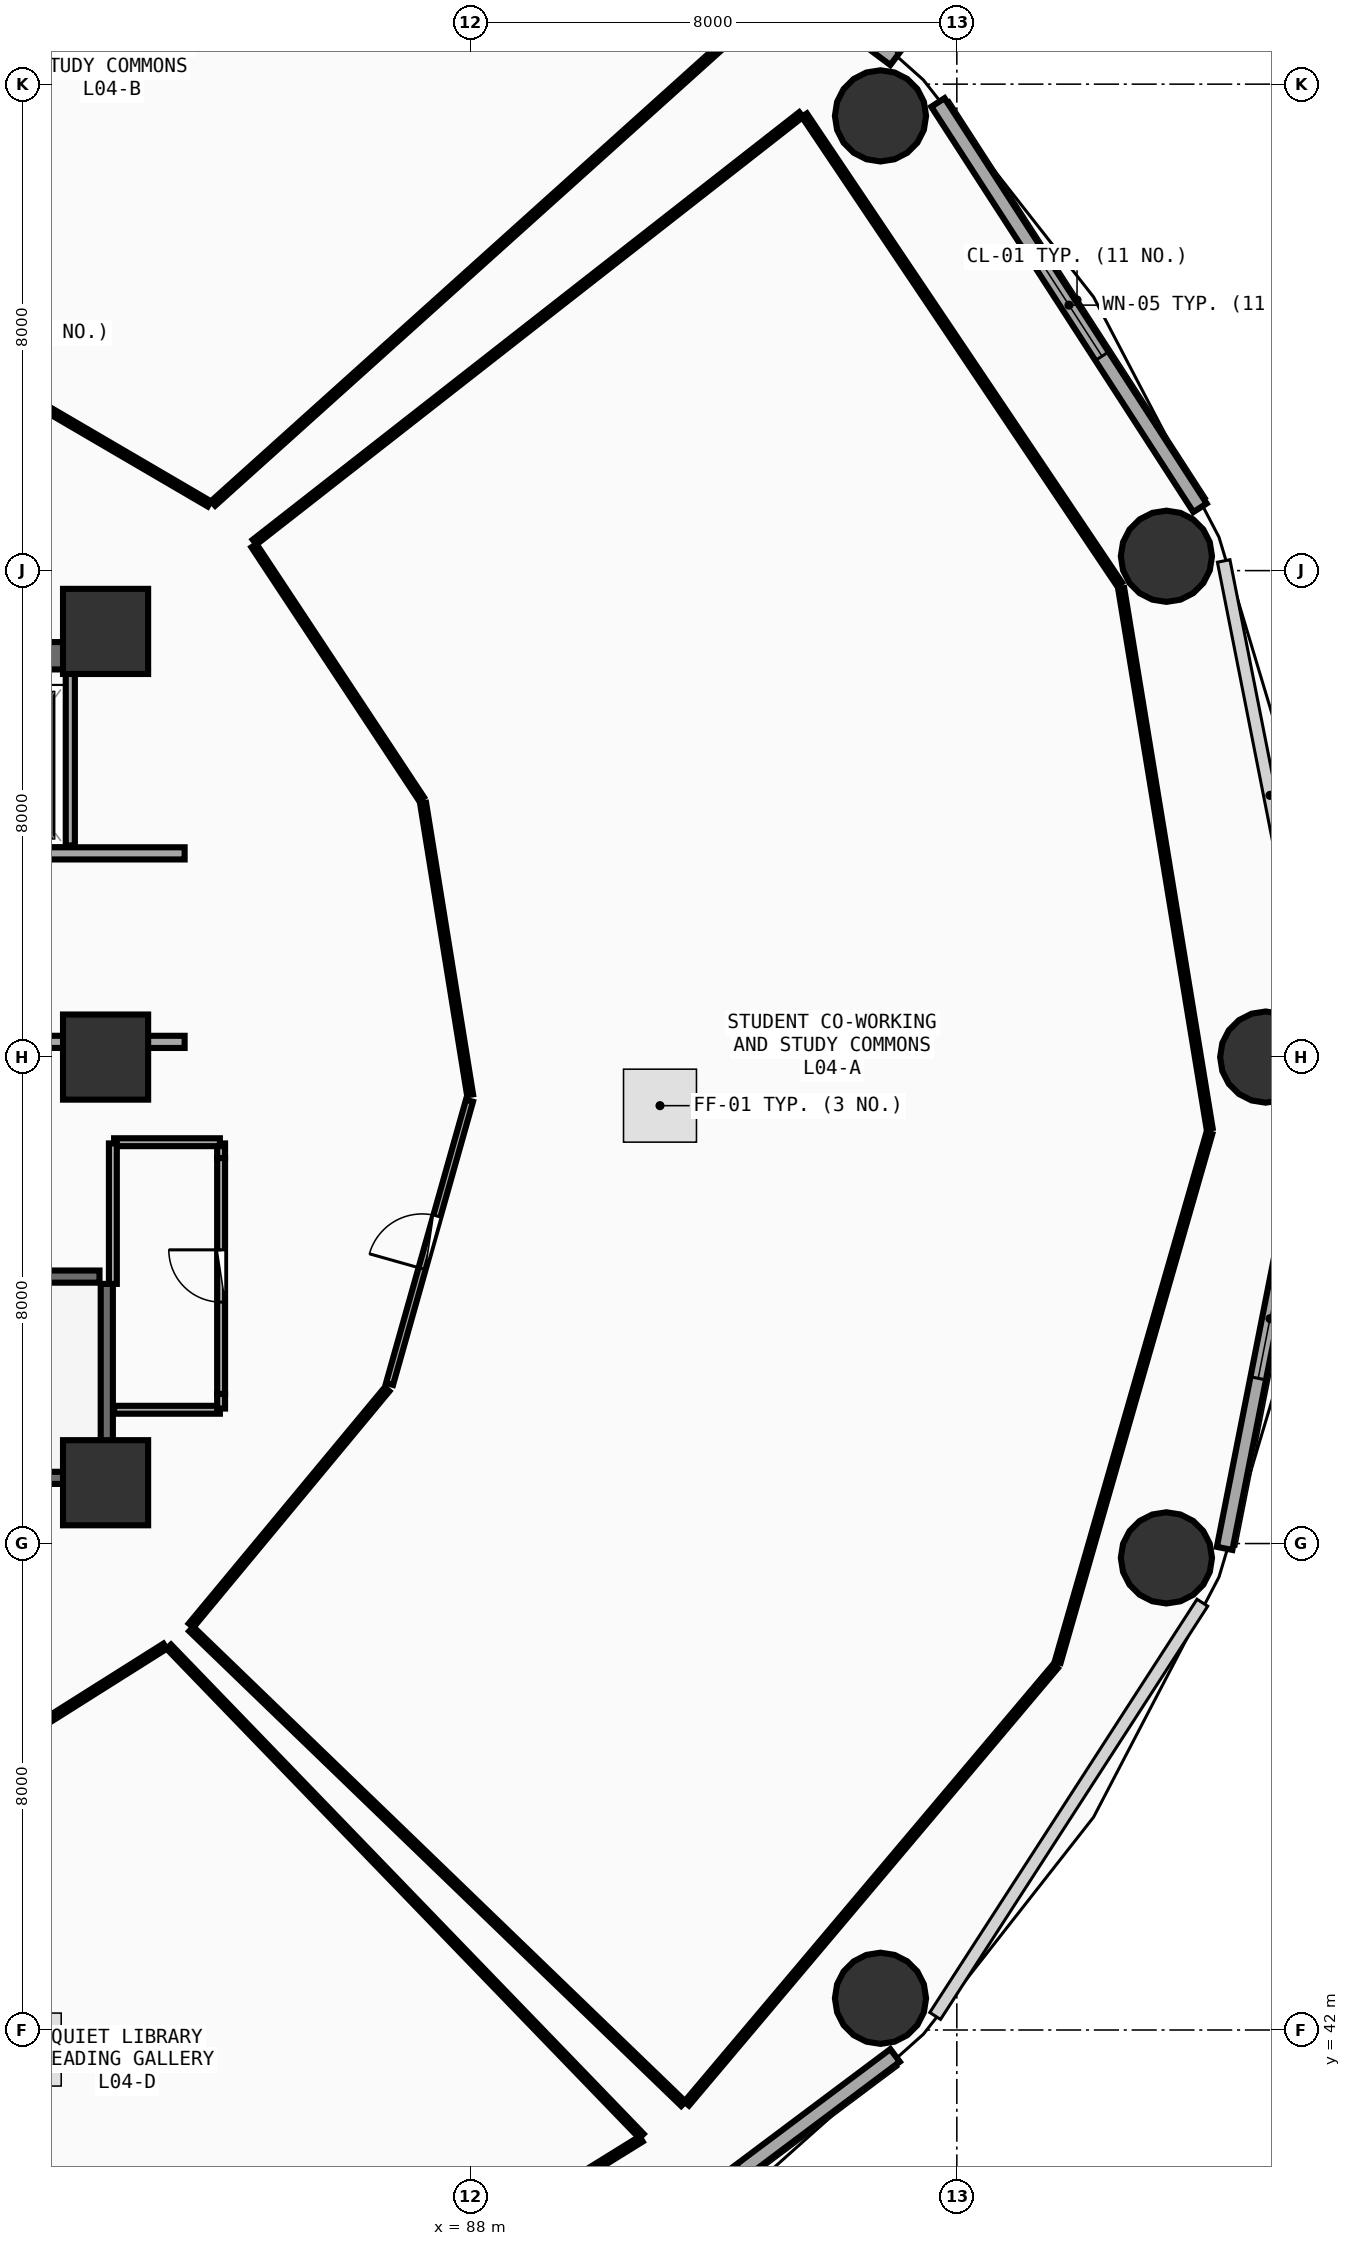
"""IFC4 building model, lengths in metres.
Left out: names, types, materials, properties, quantities, classifications, styles, units other than length and angle.
Written with IfcOpenShell. Run it as: python <this file> out.ifc"""

import sys

from ifc_helpers import new_model, si_unit, direction, frame, frame_2d, origin, origin_2d, place, context, subcontext, project, spatial, rectangle, circle, extrude, element, fill, save


model = new_model("IFC4")
c1 = context("Model", 3, precision=1e-05, world=origin(), true_north=direction((0.0, 1.0)))
c2 = subcontext(c1, "Body", "Model", "MODEL_VIEW")
j1 = project(units=[si_unit("LENGTHUNIT", "METRE"), si_unit("PLANEANGLEUNIT", "RADIAN")], contexts=[c1])
p1 = place(None, origin())
s1 = spatial("IfcSite", under=j1, at=p1, CompositionType="ELEMENT")
p2 = place(p1, origin())
s2 = spatial("IfcBuilding", under=s1, at=p2, CompositionType="ELEMENT")
p3 = place(p2, frame((0.0, 0.0, 18.0)))
s3 = spatial("IfcBuildingStorey", under=s2, at=p3, CompositionType="ELEMENT", Elevation=18.0)
for number, where, z_axis, x_axis in (
    (1, (82.0, 51.0, 0.0), (0.0, 0.0, 1.0), (1.0, 0.0, 0.0)),
    (2, (82.0, 58.0, 0.0), (0.0, 0.0, 1.0), (1.0, 0.0, 0.0)),
    (3, (82.0, 65.0, 0.0), (0.0, 0.0, 1.0), (1.0, 0.0, 0.0)),
):
    element("IfcColumn", number, at=place(p3, frame(where, z_axis=z_axis, x_axis=x_axis)), inside=s3, PredefinedType="PILASTER", context=c2, shape_type="SweptSolid", body=[
        extrude(rectangle(XDim=1.4, YDim=1.4, at=origin_2d()), origin(), (0.0, 0.0, 1.0), 4.5),
    ])
for number, where, z_axis, x_axis in (
    (4, (101.08, 58.0, 0.0), (0.0, 0.0, 1.0), (1.0, 0.0, 0.0)),
    (5, (99.447, 66.236, 0.0), (0.0, 0.0, 1.0), (1.0, 0.0, 0.0)),
    (6, (94.744, 73.478, 0.0), (0.0, 0.0, 1.0), (1.0, 0.0, 0.0)),
    (7, (94.744, 42.522, 0.0), (0.0, 0.0, 1.0), (1.0, 0.0, 0.0)),
    (8, (99.447, 49.764, 0.0), (0.0, 0.0, 1.0), (1.0, 0.0, 0.0)),
):
    element("IfcColumn", number, at=place(p3, frame(where, z_axis=z_axis, x_axis=x_axis)), inside=s3, PredefinedType="COLUMN", context=c2, shape_type="SweptSolid", body=[
        extrude(circle(Radius=0.75, at=origin_2d()), origin(), (0.0, 0.0, 1.0), 4.5),
    ])
p4 = place(p3, frame((99.999, 67.033, 0.0), z_axis=(0.0, 0.0, 1.0), x_axis=(-0.543005114258, 0.839729388488, 0.0)))
e9 = element("IfcWall", 9, at=p4, inside=s3, PredefinedType="SOLIDWALL", context=c2, shape_type="SweptSolid", body=[
    extrude(rectangle(XDim=7.938, YDim=0.26, at=frame_2d((3.969, 0.0))), origin(), (0.0, 0.0, 1.0), 4.225),
])
p5 = place(p4, frame((2.969, 0.0, 0.85)))
e10 = element("IfcOpeningElement", 10, at=p5, cuts=e9, PredefinedType="OPENING", context=c2, shape_type="SweptSolid", body=[
    extrude(rectangle(XDim=2.0, YDim=1.75, at=frame_2d((1.0, 0.875))), frame((0.0, 0.14, 0.0), z_axis=(0.0, -1.0, 0.0), x_axis=(1.0, 0.0, 0.0)), (0.0, 0.0, 1.0), 0.28),
])
p6 = place(p3, frame((94.984, 74.418, 0.0), z_axis=(0.0, 0.0, 1.0), x_axis=(-0.80030733173, 0.599590005569, 0.0)))
e11 = element("IfcWall", 11, at=p6, inside=s3, PredefinedType="SOLIDWALL", context=c2, shape_type="SweptSolid", body=[
    extrude(rectangle(XDim=8.291, YDim=0.26, at=frame_2d((4.145, 0.0))), origin(), (0.0, 0.0, 1.0), 4.225),
])
p7 = place(p6, frame((3.145, 0.0, 0.85)))
e12 = element("IfcOpeningElement", 12, at=p7, cuts=e11, PredefinedType="OPENING", context=c2, shape_type="SweptSolid", body=[
    extrude(rectangle(XDim=2.0, YDim=1.75, at=frame_2d((1.0, 0.875))), frame((0.0, 0.14, 0.0), z_axis=(0.0, -1.0, 0.0), x_axis=(1.0, 0.0, 0.0)), (0.0, 0.0, 1.0), 0.28),
])
p8 = place(p3, frame((88.349, 36.611, 0.0), z_axis=(0.0, 0.0, 1.0), x_axis=(0.80030733173, 0.599590005569, 0.0)))
e13 = element("IfcWall", 13, at=p8, inside=s3, PredefinedType="SOLIDWALL", context=c2, shape_type="SweptSolid", body=[
    extrude(rectangle(XDim=8.291, YDim=0.26, at=frame_2d((4.145, 0.0))), origin(), (0.0, 0.0, 1.0), 4.225),
])
p9 = place(p8, frame((3.145, 0.0, 0.85)))
e14 = element("IfcOpeningElement", 14, at=p9, cuts=e13, PredefinedType="OPENING", context=c2, shape_type="SweptSolid", body=[
    extrude(rectangle(XDim=2.0, YDim=1.75, at=frame_2d((1.0, 0.875))), frame((0.0, 0.14, 0.0), z_axis=(0.0, -1.0, 0.0), x_axis=(1.0, 0.0, 0.0)), (0.0, 0.0, 1.0), 0.28),
])
p10 = place(p3, frame((100.404, 49.92, 0.0), z_axis=(0.0, 0.0, 1.0), x_axis=(0.193726159581, 0.98105564322, 0.0)))
e15 = element("IfcWall", 15, at=p10, inside=s3, PredefinedType="SOLIDWALL", context=c2, shape_type="SweptSolid", body=[
    extrude(rectangle(XDim=7.703, YDim=0.26, at=frame_2d((3.851, 0.0))), origin(), (0.0, 0.0, 1.0), 4.225),
])
p11 = place(p10, frame((2.851, 0.0, 0.85)))
e16 = element("IfcOpeningElement", 16, at=p11, cuts=e15, PredefinedType="OPENING", context=c2, shape_type="SweptSolid", body=[
    extrude(rectangle(XDim=2.0, YDim=1.75, at=frame_2d((1.0, 0.875))), frame((0.0, 0.14, 0.0), z_axis=(0.0, -1.0, 0.0), x_axis=(1.0, 0.0, 0.0)), (0.0, 0.0, 1.0), 0.28),
])
p12 = place(p3, frame((74.0, 51.08, 0.0), z_axis=(0.0, 0.0, 1.0), x_axis=(1.0, 0.0, 0.0)))
e17 = element("IfcWall", 17, at=p12, inside=s3, PredefinedType="SHEAR", context=c2, shape_type="SweptSolid", body=[
    extrude(rectangle(XDim=7.9, YDim=0.2, at=frame_2d((3.95, 0.0))), origin(), (0.0, 0.0, 1.0), 4.24),
])
p13 = place(p12, frame((1.12, 0.0, 0.0)))
e18 = element("IfcOpeningElement", 18, at=p13, cuts=e17, PredefinedType="OPENING", context=c2, shape_type="SweptSolid", body=[
    extrude(rectangle(XDim=1.05, YDim=2.1, at=frame_2d((0.525, 1.05))), frame((0.0, 0.11, 0.0), z_axis=(0.0, -1.0, 0.0), x_axis=(1.0, 0.0, 0.0)), (0.0, 0.0, 1.0), 0.22),
])
p14 = place(p3, frame((82.02, 51.2, 0.0), z_axis=(0.0, 0.0, 1.0), x_axis=(0.0, 1.0, 0.0)))
e19 = element("IfcWall", 19, at=p14, inside=s3, PredefinedType="SHEAR", context=c2, shape_type="SweptSolid", body=[
    extrude(rectangle(XDim=3.07, YDim=0.2, at=frame_2d((1.535, 0.0))), origin(), (0.0, 0.0, 1.0), 4.24),
])
p15 = place(p3, frame((81.9, 54.39, 0.0), z_axis=(0.0, 0.0, 1.0), x_axis=(-1.0, 0.0, 0.0)))
e20 = element("IfcWall", 20, at=p15, inside=s3, PredefinedType="SHEAR", context=c2, shape_type="SweptSolid", body=[
    extrude(rectangle(XDim=8.46, YDim=0.2, at=frame_2d((4.23, 0.0))), origin(), (0.0, 0.0, 1.0), 4.24),
])
p16 = place(p3, frame((74.0, 64.6, 0.0), z_axis=(0.0, 0.0, 1.0), x_axis=(1.0, 0.0, 0.0)))
e21 = element("IfcWall", 21, at=p16, inside=s3, PredefinedType="SHEAR", context=c2, shape_type="SweptSolid", body=[
    extrude(rectangle(XDim=8.0, YDim=0.45, at=frame_2d((4.0, 0.0))), origin(), (0.0, 0.0, 1.0), 4.24),
])
p17 = place(p3, frame((79.3, 61.35, 0.0), z_axis=(0.0, 0.0, 1.0), x_axis=(1.0, 0.0, 0.0)))
e22 = element("IfcWall", 22, at=p17, inside=s3, PredefinedType="SOLIDWALL", context=c2, shape_type="SweptSolid", body=[
    extrude(rectangle(XDim=4.0, YDim=0.2, at=frame_2d((2.0, 0.0))), origin(), (0.0, 0.0, 1.0), 3.525),
])
p18 = place(p17, frame((0.45, 0.0, 0.0)))
e23 = element("IfcOpeningElement", 23, at=p18, cuts=e22, PredefinedType="OPENING", context=c2, shape_type="SweptSolid", body=[
    extrude(rectangle(XDim=1.2, YDim=2.15, at=frame_2d((0.6, 1.075))), frame((0.0, 0.11, 0.0), z_axis=(0.0, -1.0, 0.0), x_axis=(1.0, 0.0, 0.0)), (0.0, 0.0, 1.0), 0.22),
])
p19 = place(p3, frame((81.42, 61.48, 0.0), z_axis=(0.0, 0.0, 1.0), x_axis=(0.0, 1.0, 0.0)))
e24 = element("IfcWall", 24, at=p19, inside=s3, PredefinedType="PARTITIONING", context=c2, shape_type="SweptSolid", body=[
    extrude(rectangle(XDim=2.84, YDim=0.15, at=frame_2d((1.42, 0.0))), origin(), (0.0, 0.0, 1.0), 4.23),
])
p20 = place(p3, frame((79.3, 58.25, 0.0), z_axis=(0.0, 0.0, 1.0), x_axis=(1.0, 0.0, 0.0)))
e25 = element("IfcWall", 25, at=p20, inside=s3, PredefinedType="SOLIDWALL", context=c2, shape_type="SweptSolid", body=[
    extrude(rectangle(XDim=4.0, YDim=0.2, at=frame_2d((2.0, 0.0))), origin(), (0.0, 0.0, 1.0), 3.525),
])
p21 = place(p20, frame((0.5, 0.0, 0.0)))
e26 = element("IfcOpeningElement", 26, at=p21, cuts=e25, PredefinedType="OPENING", context=c2, shape_type="SweptSolid", body=[
    extrude(rectangle(XDim=1.1, YDim=2.1, at=frame_2d((0.55, 1.05))), frame((0.0, 0.11, 0.0), z_axis=(0.0, -1.0, 0.0), x_axis=(1.0, 0.0, 0.0)), (0.0, 0.0, 1.0), 0.22),
])
p22 = place(p3, frame((83.9, 52.46, 0.0), z_axis=(0.0, 0.0, 1.0), x_axis=(0.0, 1.0, 0.0)))
e27 = element("IfcWall", 27, at=p22, inside=s3, PredefinedType="PLUMBINGWALL", context=c2, shape_type="SweptSolid", body=[
    extrude(rectangle(XDim=3.88, YDim=0.13, at=frame_2d((1.94, 0.0))), origin(), (0.0, 0.0, 1.0), 4.23),
])
p23 = place(p22, frame((1.51, 0.0, 0.0)))
e28 = element("IfcOpeningElement", 28, at=p23, cuts=e27, PredefinedType="OPENING", context=c2, shape_type="SweptSolid", body=[
    extrude(rectangle(XDim=0.86, YDim=2.05, at=frame_2d((0.43, 1.025))), frame((0.0, 0.075, 0.0), z_axis=(0.0, -1.0, 0.0), x_axis=(1.0, 0.0, 0.0)), (0.0, 0.0, 1.0), 0.15),
])
p24 = place(p3, frame((86.67, 52.625, 0.0), z_axis=(0.0, 0.0, 1.0), x_axis=(0.27156800538, 0.962419252953, 0.0)))
e29 = element("IfcWall", 29, at=p24, inside=s3, PredefinedType="PARTITIONING", context=c2, shape_type="SweptSolid", body=[
    extrude(rectangle(XDim=4.839, YDim=0.12, at=frame_2d((2.42, 0.0))), origin(), (0.0, 0.0, 1.0), 4.23),
])
p25 = place(p24, frame((1.97, 0.0, 0.0)))
e30 = element("IfcOpeningElement", 30, at=p25, cuts=e29, PredefinedType="OPENING", context=c2, shape_type="SweptSolid", body=[
    extrude(rectangle(XDim=0.9, YDim=2.08, at=frame_2d((0.45, 1.04))), frame((0.0, 0.07, 0.0), z_axis=(0.0, -1.0, 0.0), x_axis=(1.0, 0.0, 0.0)), (0.0, 0.0, 1.0), 0.14),
])
p26 = place(p3, frame((82.14, 52.2, 0.0), z_axis=(0.0, 0.0, 1.0), x_axis=(1.0, 0.0, 0.0)))
e31 = element("IfcWall", 31, at=p26, inside=s3, PredefinedType="PLUMBINGWALL", context=c2, shape_type="SweptSolid", body=[
    extrude(rectangle(XDim=1.74, YDim=0.13, at=frame_2d((0.87, 0.0))), origin(), (0.0, 0.0, 1.0), 3.525),
])
for number, where, z_axis, x_axis in (
    (32, (83.9, 52.22, 0.0), (0.0, 0.0, 1.0), (0.0, 1.0, 0.0)),
    (33, (83.9, 56.34, 0.0), (0.0, 0.0, 1.0), (0.0, 1.0, 0.0)),
):
    element("IfcWall", number, at=place(p3, frame(where, z_axis=z_axis, x_axis=x_axis)), inside=s3, PredefinedType="PLUMBINGWALL", context=c2, shape_type="SweptSolid", body=[
        extrude(rectangle(XDim=0.24, YDim=0.13, at=frame_2d((0.12, 0.0))), origin(), (0.0, 0.0, 1.0), 4.23),
    ])
p27 = place(p3, frame((83.88, 56.6, 0.0), z_axis=(0.0, 0.0, 1.0), x_axis=(-1.0, 0.0, 0.0)))
e34 = element("IfcWall", 34, at=p27, inside=s3, PredefinedType="PLUMBINGWALL", context=c2, shape_type="SweptSolid", body=[
    extrude(rectangle(XDim=1.74, YDim=0.13, at=frame_2d((0.87, 0.0))), origin(), (0.0, 0.0, 1.0), 3.525),
])
p28 = place(p3, frame((82.12, 56.58, 0.0), z_axis=(0.0, 0.0, 1.0), x_axis=(0.0, -1.0, 0.0)))
e35 = element("IfcWall", 35, at=p28, inside=s3, PredefinedType="PLUMBINGWALL", context=c2, shape_type="SweptSolid", body=[
    extrude(rectangle(XDim=2.31, YDim=0.13, at=frame_2d((1.155, 0.0))), origin(), (0.0, 0.0, 1.0), 3.525),
])
p29 = place(p3, frame((83.406, 48.653, 0.0), z_axis=(0.0, 0.0, 1.0), x_axis=(0.638526743423, 0.769599634832, 0.0)))
e36 = element("IfcWall", 36, at=p29, inside=s3, PredefinedType="PARTITIONING", context=c2, shape_type="SweptSolid", body=[
    extrude(rectangle(XDim=5.046, YDim=0.1, at=frame_2d((2.523, 0.0))), origin(), (0.0, 0.0, 1.0), 3.625),
])
p30 = place(p3, frame((87.995, 57.379, 0.0), z_axis=(0.0, 0.0, 1.0), x_axis=(-0.159023783725, 0.987274752138, 0.0)))
e37 = element("IfcWall", 37, at=p30, inside=s3, PredefinedType="PARTITIONING", context=c2, shape_type="SweptSolid", body=[
    extrude(rectangle(XDim=4.856, YDim=0.1, at=frame_2d((2.428, 0.0))), origin(), (0.0, 0.0, 1.0), 3.625),
])
p31 = place(p3, frame((87.194, 62.246, 0.0), z_axis=(0.0, 0.0, 1.0), x_axis=(-0.551434167509, 0.834218411991, 0.0)))
e38 = element("IfcWall", 38, at=p31, inside=s3, PredefinedType="PARTITIONING", context=c2, shape_type="SweptSolid", body=[
    extrude(rectangle(XDim=4.992, YDim=0.1, at=frame_2d((2.496, 0.0))), origin(), (0.0, 0.0, 1.0), 3.625),
])
p32 = place(p3, frame((84.45, 66.469, 0.0), z_axis=(0.0, 0.0, 1.0), x_axis=(0.787637262368, 0.616139223657, 0.0)))
e39 = element("IfcWall", 39, at=p32, inside=s3, PredefinedType="PARTITIONING", context=c2, shape_type="SweptSolid", body=[
    extrude(rectangle(XDim=11.411, YDim=0.1, at=frame_2d((5.706, 0.0))), origin(), (0.0, 0.0, 1.0), 3.625),
])
p33 = place(p3, frame((93.492, 73.491, 0.0), z_axis=(0.0, 0.0, 1.0), x_axis=(0.557691554606, -0.830048269633, 0.0)))
e40 = element("IfcWall", 40, at=p33, inside=s3, PredefinedType="PARTITIONING", context=c2, shape_type="SweptSolid", body=[
    extrude(rectangle(XDim=9.293, YDim=0.1, at=frame_2d((4.646, 0.0))), origin(), (0.0, 0.0, 1.0), 3.625),
])
p34 = place(p3, frame((98.704, 65.705, 0.0), z_axis=(0.0, 0.0, 1.0), x_axis=(0.161586587371, -0.986858538384, 0.0)))
e41 = element("IfcWall", 41, at=p34, inside=s3, PredefinedType="PARTITIONING", context=c2, shape_type="SweptSolid", body=[
    extrude(rectangle(XDim=8.997, YDim=0.1, at=frame_2d((4.499, 0.0))), origin(), (0.0, 0.0, 1.0), 3.625),
])
p35 = place(p3, frame((100.153, 56.748, 0.0), z_axis=(0.0, 0.0, 1.0), x_axis=(-0.275668999864, -0.96125262159, 0.0)))
e42 = element("IfcWall", 42, at=p35, inside=s3, PredefinedType="PARTITIONING", context=c2, shape_type="SweptSolid", body=[
    extrude(rectangle(XDim=9.048, YDim=0.1, at=frame_2d((4.524, 0.0))), origin(), (0.0, 0.0, 1.0), 3.625),
])
p36 = place(p3, frame((97.622, 47.981, 0.0), z_axis=(0.0, 0.0, 1.0), x_axis=(-0.64470133806, -0.764434552269, 0.0)))
e43 = element("IfcWall", 43, at=p36, inside=s3, PredefinedType="PARTITIONING", context=c2, shape_type="SweptSolid", body=[
    extrude(rectangle(XDim=9.408, YDim=0.1, at=frame_2d((4.704, 0.0))), origin(), (0.0, 0.0, 1.0), 3.625),
])
p37 = place(p3, frame((91.502, 40.787, 0.0), z_axis=(0.0, 0.0, 1.0), x_axis=(-0.719662166332, 0.694324395618, 0.0)))
e44 = element("IfcWall", 44, at=p37, inside=s3, PredefinedType="PARTITIONING", context=c2, shape_type="SweptSolid", body=[
    extrude(rectangle(XDim=11.245, YDim=0.1, at=frame_2d((5.622, 0.0))), origin(), (0.0, 0.0, 1.0), 3.925),
])
p38 = place(p3, frame((83.705, 67.098, 0.0), z_axis=(0.0, 0.0, 1.0), x_axis=(-0.863300951282, 0.504689476327, 0.0)))
e45 = element("IfcWall", 45, at=p38, inside=s3, PredefinedType="PARTITIONING", context=c2, shape_type="SweptSolid", body=[
    extrude(rectangle(XDim=5.117, YDim=0.1, at=frame_2d((2.559, 0.0))), origin(), (0.0, 0.0, 1.0), 3.625),
])
p39 = place(p3, frame((92.17, 74.662, 0.0), z_axis=(0.0, 0.0, 1.0), x_axis=(-0.743473519906, -0.668765373803, 0.0)))
e46 = element("IfcWall", 46, at=p39, inside=s3, PredefinedType="PARTITIONING", context=c2, shape_type="SweptSolid", body=[
    extrude(rectangle(XDim=11.301, YDim=0.1, at=frame_2d((5.65, 0.0))), origin(), (0.0, 0.0, 1.0), 3.925),
])
p40 = place(p3, frame((81.044, 47.092, 0.0), z_axis=(0.0, 0.0, 1.0), x_axis=(0.845952823598, 0.533257742791, 0.0)))
e47 = element("IfcWall", 47, at=p40, inside=s3, PredefinedType="PARTITIONING", context=c2, shape_type="SweptSolid", body=[
    extrude(rectangle(XDim=2.287, YDim=0.1, at=frame_2d((1.144, 0.0))), origin(), (0.0, 0.0, 1.0), 3.625),
])
p41 = place(p3, frame((83.04, 48.304, 0.0), z_axis=(0.0, 0.0, 1.0), x_axis=(0.694759604878, -0.719242025628, 0.0)))
e48 = element("IfcWall", 48, at=p41, inside=s3, PredefinedType="PARTITIONING", context=c2, shape_type="SweptSolid", body=[
    extrude(rectangle(XDim=11.189, YDim=0.1, at=frame_2d((5.594, 0.0))), origin(), (0.0, 0.0, 1.0), 3.625),
])
p42 = place(p3, frame((90.807, 40.207, 0.0), z_axis=(0.0, 0.0, 1.0), x_axis=(-0.849859173494, -0.527009853066, 0.0)))
e49 = element("IfcWall", 49, at=p42, inside=s3, PredefinedType="PARTITIONING", context=c2, shape_type="SweptSolid", body=[
    extrude(rectangle(XDim=4.322, YDim=0.1, at=frame_2d((2.161, 0.0))), origin(), (0.0, 0.0, 1.0), 3.625),
])
p43 = place(p5, origin())
e50 = element("IfcWindow", 50, at=p43, inside=s3, PartitioningType="SINGLE_PANEL", PredefinedType="WINDOW", context=c2, shape_type="SweptSolid", body=[
    extrude(rectangle(XDim=2.0, YDim=1.75, at=frame_2d((1.0, 0.875))), frame((0.0, 0.03, 0.0), z_axis=(0.0, -1.0, 0.0), x_axis=(1.0, 0.0, 0.0)), (0.0, 0.0, 1.0), 0.06),
])
fill(e10, e50)
p44 = place(p11, origin())
e51 = element("IfcWindow", 51, at=p44, inside=s3, PartitioningType="SINGLE_PANEL", PredefinedType="WINDOW", context=c2, shape_type="SweptSolid", body=[
    extrude(rectangle(XDim=2.0, YDim=1.75, at=frame_2d((1.0, 0.875))), frame((0.0, 0.03, 0.0), z_axis=(0.0, -1.0, 0.0), x_axis=(1.0, 0.0, 0.0)), (0.0, 0.0, 1.0), 0.06),
])
fill(e16, e51)
p45 = place(p23, origin())
e52 = element("IfcDoor", 52, at=p45, inside=s3, OperationType="SINGLE_SWING_RIGHT", PredefinedType="DOOR", context=c2, shape_type="SweptSolid", body=[
    extrude(rectangle(XDim=0.86, YDim=2.05, at=frame_2d((0.43, 1.025))), frame((0.0, 0.025, 0.0), z_axis=(0.0, -1.0, 0.0), x_axis=(1.0, 0.0, 0.0)), (0.0, 0.0, 1.0), 0.05),
])
fill(e28, e52)
p46 = place(p25, origin())
e53 = element("IfcDoor", 53, at=p46, inside=s3, OperationType="SINGLE_SWING_LEFT", PredefinedType="DOOR", context=c2, shape_type="SweptSolid", body=[
    extrude(rectangle(XDim=0.9, YDim=2.08, at=frame_2d((0.45, 1.04))), frame((0.0, 0.025, 0.0), z_axis=(0.0, -1.0, 0.0), x_axis=(1.0, 0.0, 0.0)), (0.0, 0.0, 1.0), 0.05),
])
fill(e30, e53)
save(model, sys.argv[1])
